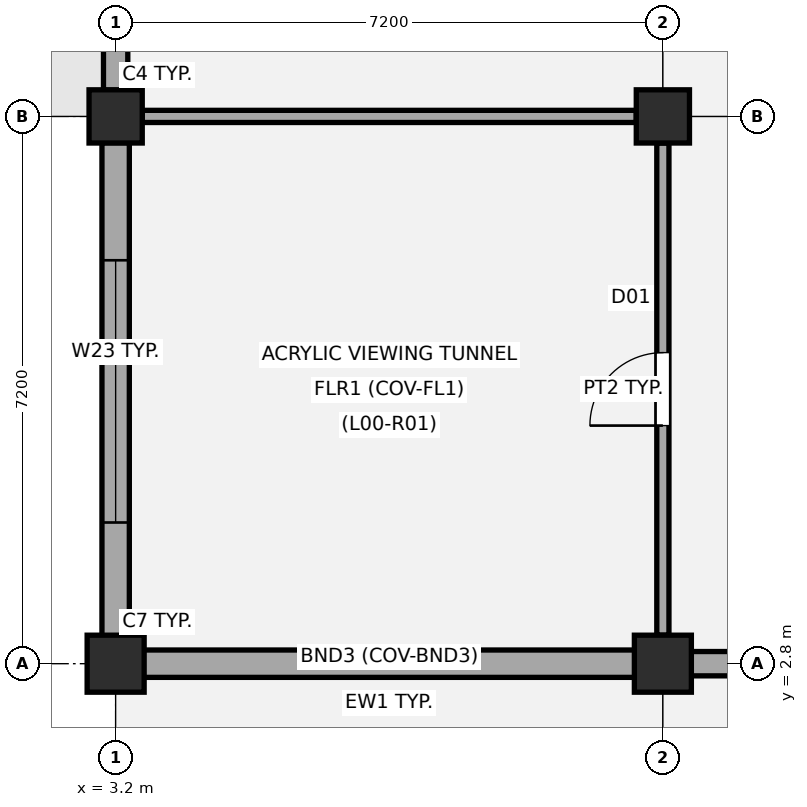
"""IFC4 building model, lengths in metres.
Left out: names, types, materials, properties, quantities, classifications, styles, units other than length and angle.
Written with IfcOpenShell. Run it as: python <this file> out.ifc"""

import sys

from ifc_helpers import new_model, si_unit, direction, frame, frame_2d, origin, origin_2d, place, context, subcontext, project, spatial, rectangle, circle, extrude, element, fill, save


model = new_model("IFC4")
c1 = context("Model", 3, precision=1e-05, world=origin(), true_north=direction((0.0, 1.0)))
c2 = subcontext(c1, "Body", "Model", "MODEL_VIEW")
j1 = project(units=[si_unit("LENGTHUNIT", "METRE"), si_unit("PLANEANGLEUNIT", "RADIAN")], contexts=[c1])
p1 = place(None, origin())
s1 = spatial("IfcSite", under=j1, at=p1, CompositionType="ELEMENT")
p2 = place(p1, origin())
s2 = spatial("IfcBuilding", under=s1, at=p2, CompositionType="ELEMENT")
p3 = place(p2, origin())
s3 = spatial("IfcBuildingStorey", under=s2, at=p3, CompositionType="ELEMENT", Elevation=0.0)
p4 = place(p3, frame((3.2, 2.8, -0.35), z_axis=(0.0, 0.0, 1.0), x_axis=(1.0, 0.0, 0.0)))
e1 = element("IfcColumn", 1, at=p4, inside=s3, PredefinedType="COLUMN", context=c2, shape_type="SweptSolid", body=[
    extrude(circle(Radius=0.375, at=origin_2d()), origin(), (0.0, 0.0, 1.0), 5.03),
])
p5 = place(p3, frame((3.2, 10.0, -0.35), z_axis=(0.0, 0.0, 1.0), x_axis=(1.0, 0.0, 0.0)))
e2 = element("IfcColumn", 2, at=p5, inside=s3, PredefinedType="COLUMN", context=c2, shape_type="SweptSolid", body=[
    extrude(rectangle(XDim=0.7, YDim=0.7, at=origin_2d()), origin(), (0.0, 0.0, 1.0), 5.03),
])
p6 = place(p3, frame((10.4, 2.8, -0.35), z_axis=(0.0, 0.0, 1.0), x_axis=(1.0, 0.0, 0.0)))
e3 = element("IfcColumn", 3, at=p6, inside=s3, PredefinedType="COLUMN", context=c2, shape_type="SweptSolid", body=[
    extrude(circle(Radius=0.375, at=origin_2d()), origin(), (0.0, 0.0, 1.0), 5.03),
])
p7 = place(p3, frame((10.4, 10.0, -0.35), z_axis=(0.0, 0.0, 1.0), x_axis=(1.0, 0.0, 0.0)))
e4 = element("IfcColumn", 4, at=p7, inside=s3, PredefinedType="COLUMN", context=c2, shape_type="SweptSolid", body=[
    extrude(rectangle(XDim=0.7, YDim=0.7, at=origin_2d()), origin(), (0.0, 0.0, 1.0), 5.03),
])
p8 = place(p3, frame((10.09, 2.8, 0.0), z_axis=(0.0, 0.0, 1.0), x_axis=(-1.0, 0.0, 0.0)))
e5 = element("IfcWall", 5, at=p8, inside=s3, PredefinedType="STANDARD", context=c2, shape_type="SweptSolid", body=[
    extrude(rectangle(XDim=6.58, YDim=0.36, at=frame_2d((3.29, 0.0))), origin(), (0.0, 0.0, 1.0), 3.67),
])
p9 = place(p3, frame((17.29, 2.8, 0.0), z_axis=(0.0, 0.0, 1.0), x_axis=(-1.0, 0.0, 0.0)))
e6 = element("IfcWall", 6, at=p9, inside=s3, PredefinedType="STANDARD", context=c2, shape_type="SweptSolid", body=[
    extrude(rectangle(XDim=6.58, YDim=0.32, at=frame_2d((3.29, 0.0))), origin(), (0.0, 0.0, 1.0), 3.67),
])
p10 = place(p9, frame((2.39, 0.0, 0.0)))
e7 = element("IfcOpeningElement", 7, at=p10, cuts=e6, PredefinedType="OPENING", context=c2, shape_type="SweptSolid", body=[
    extrude(rectangle(XDim=1.8, YDim=2.2, at=frame_2d((0.9, 1.1))), frame((0.0, 0.17, 0.0), z_axis=(0.0, -1.0, 0.0), x_axis=(1.0, 0.0, 0.0)), (0.0, 0.0, 1.0), 0.34),
])
p11 = place(p3, frame((3.2, 3.11, 0.0), z_axis=(0.0, 0.0, 1.0), x_axis=(0.0, 1.0, 0.0)))
e8 = element("IfcWall", 8, at=p11, inside=s3, PredefinedType="STANDARD", context=c2, shape_type="SweptSolid", body=[
    extrude(rectangle(XDim=6.545, YDim=0.36, at=frame_2d((3.272, 0.0))), origin(), (0.0, 0.0, 1.0), 3.67),
])
p12 = place(p11, frame((1.548, 0.0, 0.95)))
e9 = element("IfcOpeningElement", 9, at=p12, cuts=e8, PredefinedType="OPENING", context=c2, shape_type="SweptSolid", body=[
    extrude(rectangle(XDim=3.45, YDim=2.0, at=frame_2d((1.725, 1.0))), frame((0.0, 0.19, 0.0), z_axis=(0.0, -1.0, 0.0), x_axis=(1.0, 0.0, 0.0)), (0.0, 0.0, 1.0), 0.38),
])
p13 = place(p3, frame((3.2, 10.345, 0.0), z_axis=(0.0, 0.0, 1.0), x_axis=(0.0, 1.0, 0.0)))
e10 = element("IfcWall", 10, at=p13, inside=s3, PredefinedType="STANDARD", context=c2, shape_type="SweptSolid", body=[
    extrude(rectangle(XDim=6.51, YDim=0.32, at=frame_2d((3.255, 0.0))), origin(), (0.0, 0.0, 1.0), 3.67),
])
p14 = place(p13, frame((2.065, 0.0, 0.0)))
e11 = element("IfcOpeningElement", 11, at=p14, cuts=e10, PredefinedType="OPENING", context=c2, shape_type="SweptSolid", body=[
    extrude(rectangle(XDim=2.38, YDim=2.42, at=frame_2d((1.19, 1.21))), frame((0.0, 0.17, 0.0), z_axis=(0.0, -1.0, 0.0), x_axis=(1.0, 0.0, 0.0)), (0.0, 0.0, 1.0), 0.34),
])
p15 = place(p3, frame((10.4, 3.175, 0.0), z_axis=(0.0, 0.0, 1.0), x_axis=(0.0, 1.0, 0.0)))
e12 = element("IfcWall", 12, at=p15, inside=s3, PredefinedType="PARTITIONING", context=c2, shape_type="SweptSolid", body=[
    extrude(rectangle(XDim=6.475, YDim=0.16, at=frame_2d((3.237, 0.0))), origin(), (0.0, 0.0, 1.0), 3.62),
])
p16 = place(p15, frame((2.758, 0.0, 0.0)))
e13 = element("IfcOpeningElement", 13, at=p16, cuts=e12, PredefinedType="OPENING", context=c2, shape_type="SweptSolid", body=[
    extrude(rectangle(XDim=0.96, YDim=2.1, at=frame_2d((0.48, 1.05))), frame((0.0, 0.09, 0.0), z_axis=(0.0, -1.0, 0.0), x_axis=(1.0, 0.0, 0.0)), (0.0, 0.0, 1.0), 0.18),
])
p17 = place(p3, frame((3.55, 10.0, 0.0), z_axis=(0.0, 0.0, 1.0), x_axis=(1.0, 0.0, 0.0)))
e14 = element("IfcWall", 14, at=p17, inside=s3, PredefinedType="PARTITIONING", context=c2, shape_type="SweptSolid", body=[
    extrude(rectangle(XDim=6.5, YDim=0.16, at=frame_2d((3.25, 0.0))), origin(), (0.0, 0.0, 1.0), 3.62),
])
p18 = place(p12, origin())
e15 = element("IfcWindow", 15, at=p18, inside=s3, PartitioningType="SINGLE_PANEL", PredefinedType="WINDOW", context=c2, shape_type="SweptSolid", body=[
    extrude(rectangle(XDim=3.45, YDim=2.0, at=frame_2d((1.725, 1.0))), frame((0.0, 0.03, 0.0), z_axis=(0.0, -1.0, 0.0), x_axis=(1.0, 0.0, 0.0)), (0.0, 0.0, 1.0), 0.06),
])
fill(e9, e15)
p19 = place(p16, origin())
e16 = element("IfcDoor", 16, at=p19, inside=s3, OperationType="SINGLE_SWING_LEFT", PredefinedType="DOOR", context=c2, shape_type="SweptSolid", body=[
    extrude(rectangle(XDim=0.96, YDim=2.1, at=frame_2d((0.48, 1.05))), frame((0.0, 0.025, 0.0), z_axis=(0.0, -1.0, 0.0), x_axis=(1.0, 0.0, 0.0)), (0.0, 0.0, 1.0), 0.05),
])
fill(e13, e16)
save(model, sys.argv[1])
